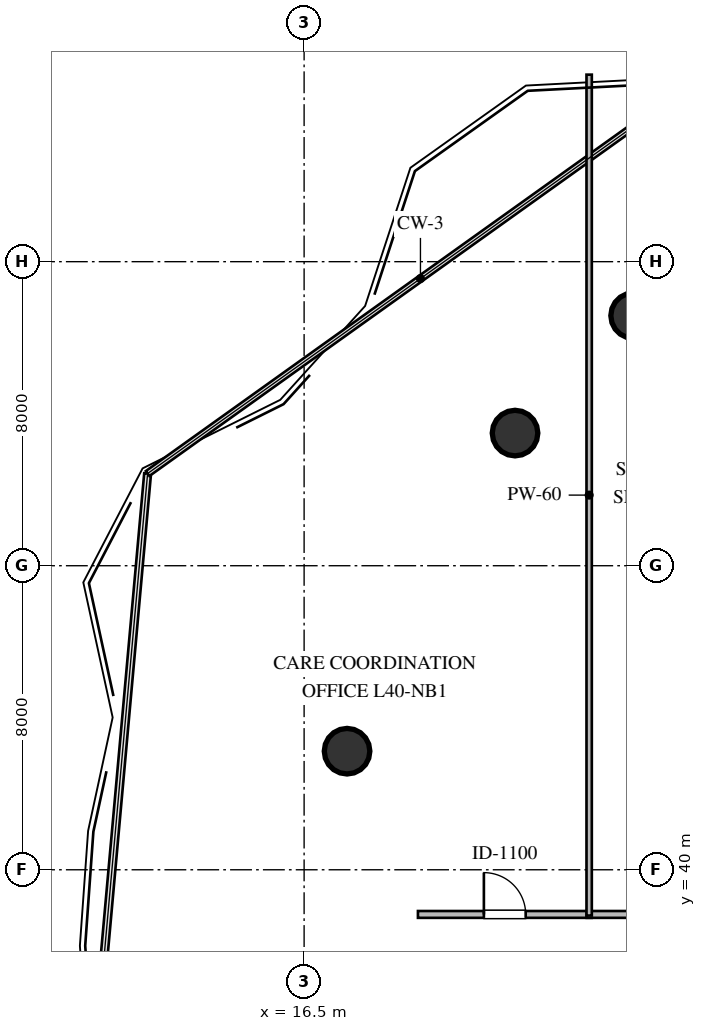
"""IFC4 building model, lengths in metres.
Left out: names, types, materials, properties, quantities, classifications, styles, units other than length and angle.
Written with IfcOpenShell. Run it as: python <this file> out.ifc"""

import sys

from ifc_helpers import new_model, si_unit, direction, frame, frame_2d, origin, origin_2d, place, context, subcontext, project, spatial, rectangle, circle, extrude, element, fill, save


model = new_model("IFC4")
c1 = context("Model", 3, precision=1e-05, world=origin(), true_north=direction((0.0, 1.0)))
c2 = subcontext(c1, "Body", "Model", "MODEL_VIEW")
j1 = project(units=[si_unit("LENGTHUNIT", "METRE"), si_unit("PLANEANGLEUNIT", "RADIAN")], contexts=[c1])
p1 = place(None, origin())
s1 = spatial("IfcSite", under=j1, at=p1, CompositionType="ELEMENT")
p2 = place(p1, origin())
s2 = spatial("IfcBuilding", under=s1, at=p2, CompositionType="ELEMENT")
p3 = place(p2, frame((0.0, 0.0, 153.0)))
s3 = spatial("IfcBuildingStorey", under=s2, at=p3, CompositionType="ELEMENT", Elevation=153.0)
for number, where, z_axis, x_axis in (
    (1, (25.17, 54.58, 0.0), (0.0, 0.0, 1.0), (1.0, 0.0, 0.0)),
    (2, (22.05, 51.49, 0.0), (0.0, 0.0, 1.0), (1.0, 0.0, 0.0)),
    (3, (17.63, 43.12, 0.0), (0.0, 0.0, 1.0), (1.0, 0.0, 0.0)),
):
    element("IfcColumn", number, at=place(p3, frame(where, z_axis=z_axis, x_axis=x_axis)), inside=s3, PredefinedType="COLUMN", context=c2, shape_type="SweptSolid", body=[
        extrude(circle(Radius=0.6, at=origin_2d()), origin(), (0.0, 0.0, 1.0), 3.6),
    ])
p4 = place(p3, frame((19.495, 38.825, 0.0), z_axis=(0.0, 0.0, 1.0), x_axis=(1.0, 0.0, 0.0)))
e4 = element("IfcWall", 4, at=p4, inside=s3, PredefinedType="PARTITIONING", context=c2, shape_type="SweptSolid", body=[
    extrude(rectangle(XDim=4.57, YDim=0.18, at=frame_2d((2.285, 0.0))), origin(), (0.0, 0.0, 1.0), 3.36),
])
p5 = place(p4, frame((1.735, 0.0, 0.0)))
e5 = element("IfcOpeningElement", 5, at=p5, cuts=e4, PredefinedType="OPENING", context=c2, shape_type="SweptSolid", body=[
    extrude(rectangle(XDim=1.1, YDim=2.1, at=frame_2d((0.55, 1.05))), frame((0.0, 0.1, 0.0), z_axis=(0.0, -1.0, 0.0), x_axis=(1.0, 0.0, 0.0)), (0.0, 0.0, 1.0), 0.2),
])
p6 = place(p3, frame((23.935, 38.825, 0.0), z_axis=(0.0, 0.0, 1.0), x_axis=(1.0, 0.0, 0.0)))
e6 = element("IfcWall", 6, at=p6, inside=s3, PredefinedType="PARTITIONING", context=c2, shape_type="SweptSolid", body=[
    extrude(rectangle(XDim=5.13, YDim=0.18, at=frame_2d((2.565, 0.0))), origin(), (0.0, 0.0, 1.0), 3.36),
])
p7 = place(p6, frame((2.015, 0.0, 0.0)))
e7 = element("IfcOpeningElement", 7, at=p7, cuts=e6, PredefinedType="OPENING", context=c2, shape_type="SweptSolid", body=[
    extrude(rectangle(XDim=1.1, YDim=2.1, at=frame_2d((0.55, 1.05))), frame((0.0, 0.1, 0.0), z_axis=(0.0, -1.0, 0.0), x_axis=(1.0, 0.0, 0.0)), (0.0, 0.0, 1.0), 0.2),
])
p8 = place(p3, frame((24.0, 60.921, 0.0), z_axis=(0.0, 0.0, 1.0), x_axis=(0.0, -1.0, 0.0)))
e8 = element("IfcWall", 8, at=p8, inside=s3, PredefinedType="PARTITIONING", context=c2, shape_type="SweptSolid", body=[
    extrude(rectangle(XDim=22.126, YDim=0.14, at=frame_2d((11.063, 0.0))), origin(), (0.0, 0.0, 1.0), 2.806),
])
p9 = place(p5, origin())
e9 = element("IfcDoor", 9, at=p9, inside=s3, OperationType="SINGLE_SWING_LEFT", PredefinedType="DOOR", context=c2, shape_type="SweptSolid", body=[
    extrude(rectangle(XDim=1.1, YDim=2.1, at=frame_2d((0.55, 1.05))), frame((0.0, 0.025, 0.0), z_axis=(0.0, -1.0, 0.0), x_axis=(1.0, 0.0, 0.0)), (0.0, 0.0, 1.0), 0.05),
])
fill(e5, e9)
save(model, sys.argv[1])
